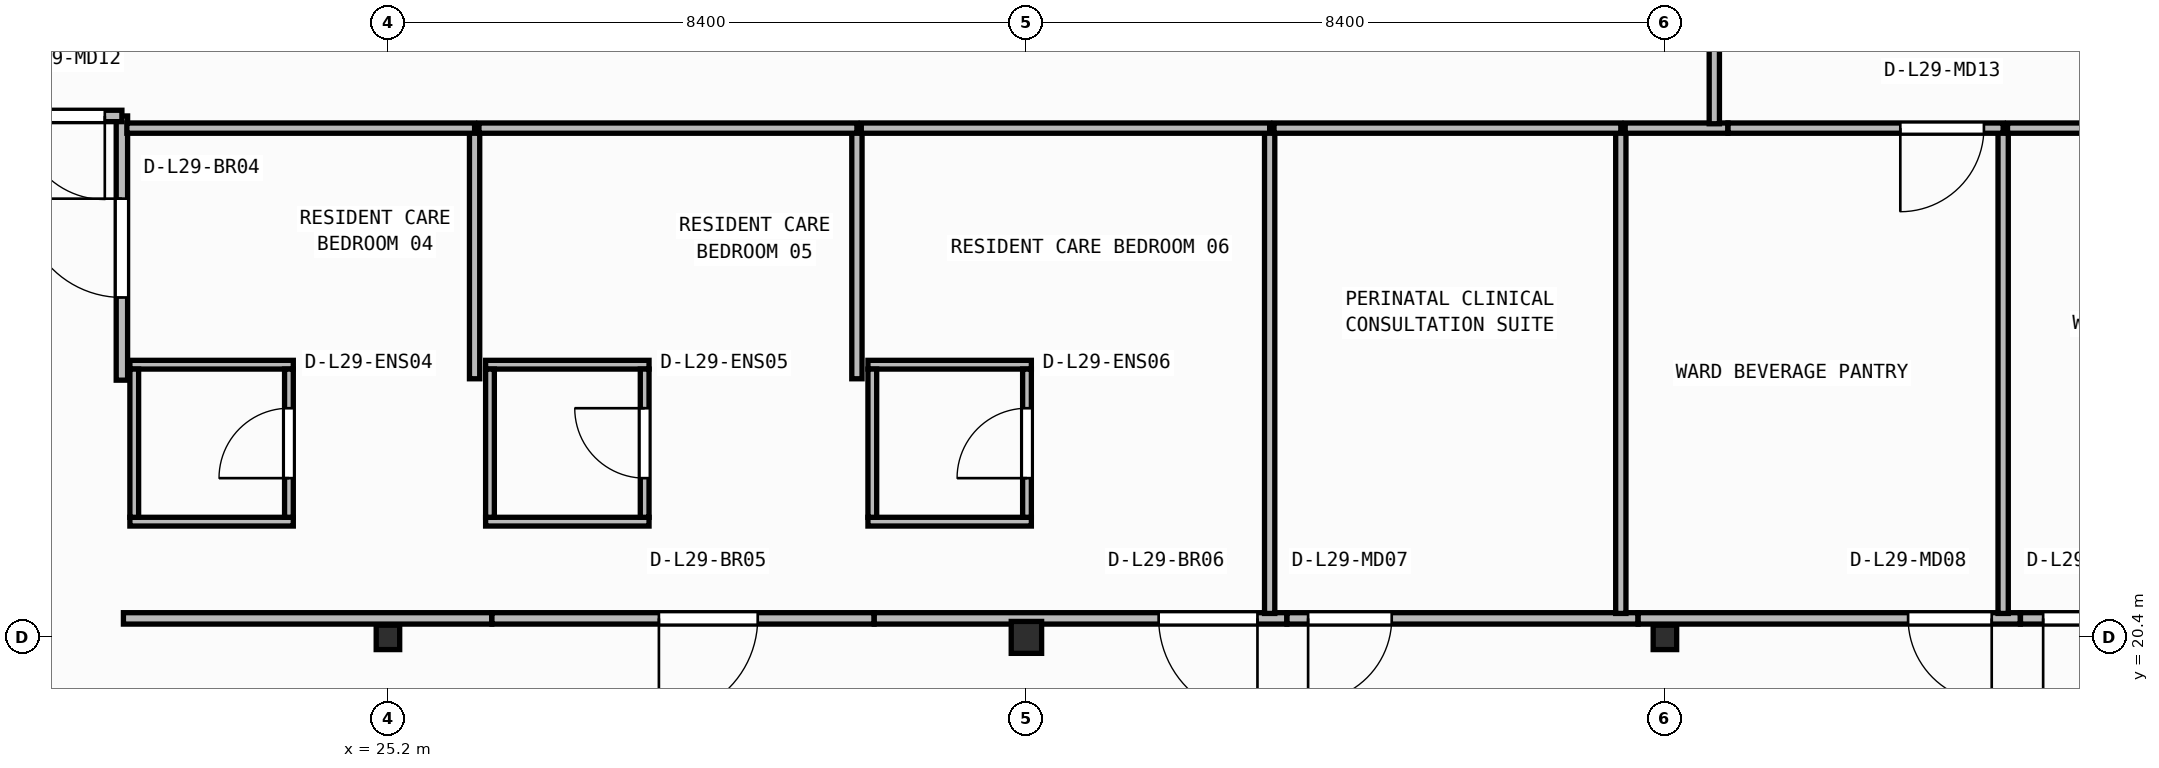
"""IFC4 building model, lengths in metres.
Left out: names, types, materials, properties, quantities, classifications, styles, units other than length and angle.
Written with IfcOpenShell. Run it as: python <this file> out.ifc"""

import sys

from ifc_helpers import new_model, si_unit, direction, frame, frame_2d, origin, origin_2d, place, context, subcontext, project, spatial, rectangle, i_section, extrude, element, fill, save


model = new_model("IFC4")
c1 = context("Model", 3, precision=1e-05, world=origin(), true_north=direction((0.0, 1.0)))
c2 = subcontext(c1, "Body", "Model", "MODEL_VIEW")
j1 = project(units=[si_unit("LENGTHUNIT", "METRE"), si_unit("PLANEANGLEUNIT", "RADIAN")], contexts=[c1])
p1 = place(None, origin())
s1 = spatial("IfcSite", under=j1, at=p1, CompositionType="ELEMENT")
p2 = place(p1, origin())
s2 = spatial("IfcBuilding", under=s1, at=p2, CompositionType="ELEMENT")
p3 = place(p2, frame((0.0, 0.0, 119.15)))
s3 = spatial("IfcBuildingStorey", under=s2, at=p3, CompositionType="ELEMENT", Elevation=119.15)
p4 = place(p3, frame((25.2, 20.4, 0.0), z_axis=(0.0, 0.0, 1.0), x_axis=(1.0, 0.0, 0.0)))
e1 = element("IfcColumn", 1, at=p4, inside=s3, PredefinedType="COLUMN", context=c2, shape_type="SweptSolid", body=[
    extrude(i_section(OverallWidth=0.309, OverallDepth=0.321, WebThickness=0.014, FlangeThickness=0.022, FilletRadius=0.017, at=origin_2d()), origin(), (0.0, 0.0, 1.0), 3.95),
])
p5 = place(p3, frame((33.6, 20.4, 0.0), z_axis=(0.0, 0.0, 1.0), x_axis=(1.0, 0.0, 0.0)))
e2 = element("IfcColumn", 2, at=p5, inside=s3, PredefinedType="COLUMN", context=c2, shape_type="SweptSolid", body=[
    extrude(i_section(OverallWidth=0.4, OverallDepth=0.42, WebThickness=0.025, FlangeThickness=0.04, at=origin_2d()), origin(), (0.0, 0.0, 1.0), 3.95),
])
p6 = place(p3, frame((42.0, 20.4, 0.0), z_axis=(0.0, 0.0, 1.0), x_axis=(1.0, 0.0, 0.0)))
e3 = element("IfcColumn", 3, at=p6, inside=s3, PredefinedType="COLUMN", context=c2, shape_type="SweptSolid", body=[
    extrude(i_section(OverallWidth=0.309, OverallDepth=0.321, WebThickness=0.014, FlangeThickness=0.022, FilletRadius=0.017, at=origin_2d()), origin(), (0.0, 0.0, 1.0), 3.95),
])
for number, where, z_axis, x_axis in (
    (4, (21.805, 21.923, 0.0), (0.0, 0.0, 1.0), (1.0, 0.0, 0.0)),
    (5, (21.805, 23.988, 0.0), (0.0, 0.0, 1.0), (1.0, 0.0, 0.0)),
):
    element("IfcWall", number, at=place(p3, frame(where, z_axis=z_axis, x_axis=x_axis)), inside=s3, PredefinedType="PARTITIONING", context=c2, shape_type="SweptSolid", body=[
        extrude(rectangle(XDim=2.15, YDim=0.115, at=frame_2d((1.075, 0.0))), origin(), (0.0, 0.0, 1.0), 3.71),
    ])
p7 = place(p3, frame((21.863, 21.98, 0.0), z_axis=(0.0, 0.0, 1.0), x_axis=(0.0, 1.0, 0.0)))
e6 = element("IfcWall", 6, at=p7, inside=s3, PredefinedType="PARTITIONING", context=c2, shape_type="SweptSolid", body=[
    extrude(rectangle(XDim=1.95, YDim=0.115, at=frame_2d((0.975, 0.0))), origin(), (0.0, 0.0, 1.0), 3.71),
])
p8 = place(p3, frame((23.897, 21.98, 0.0), z_axis=(0.0, 0.0, 1.0), x_axis=(0.0, 1.0, 0.0)))
e7 = element("IfcWall", 7, at=p8, inside=s3, PredefinedType="PARTITIONING", context=c2, shape_type="SweptSolid", body=[
    extrude(rectangle(XDim=1.95, YDim=0.115, at=frame_2d((0.975, 0.0))), origin(), (0.0, 0.0, 1.0), 3.71),
])
p9 = place(p8, frame((0.515, 0.0, 0.0)))
e8 = element("IfcOpeningElement", 8, at=p9, cuts=e7, PredefinedType="OPENING", context=c2, shape_type="SweptSolid", body=[
    extrude(rectangle(XDim=0.92, YDim=2.1, at=frame_2d((0.46, 1.05))), frame((0.0, 0.067, 0.0), z_axis=(0.0, -1.0, 0.0), x_axis=(1.0, 0.0, 0.0)), (0.0, 0.0, 1.0), 0.135),
])
for number, where, z_axis, x_axis in (
    (9, (26.485, 21.923, 0.0), (0.0, 0.0, 1.0), (1.0, 0.0, 0.0)),
    (10, (26.485, 23.988, 0.0), (0.0, 0.0, 1.0), (1.0, 0.0, 0.0)),
):
    element("IfcWall", number, at=place(p3, frame(where, z_axis=z_axis, x_axis=x_axis)), inside=s3, PredefinedType="PARTITIONING", context=c2, shape_type="SweptSolid", body=[
        extrude(rectangle(XDim=2.15, YDim=0.115, at=frame_2d((1.075, 0.0))), origin(), (0.0, 0.0, 1.0), 3.71),
    ])
p10 = place(p3, frame((26.542, 21.98, 0.0), z_axis=(0.0, 0.0, 1.0), x_axis=(0.0, 1.0, 0.0)))
e11 = element("IfcWall", 11, at=p10, inside=s3, PredefinedType="PARTITIONING", context=c2, shape_type="SweptSolid", body=[
    extrude(rectangle(XDim=1.95, YDim=0.115, at=frame_2d((0.975, 0.0))), origin(), (0.0, 0.0, 1.0), 3.71),
])
p11 = place(p3, frame((28.577, 21.98, 0.0), z_axis=(0.0, 0.0, 1.0), x_axis=(0.0, 1.0, 0.0)))
e12 = element("IfcWall", 12, at=p11, inside=s3, PredefinedType="PARTITIONING", context=c2, shape_type="SweptSolid", body=[
    extrude(rectangle(XDim=1.95, YDim=0.115, at=frame_2d((0.975, 0.0))), origin(), (0.0, 0.0, 1.0), 3.71),
])
p12 = place(p11, frame((0.515, 0.0, 0.0)))
e13 = element("IfcOpeningElement", 13, at=p12, cuts=e12, PredefinedType="OPENING", context=c2, shape_type="SweptSolid", body=[
    extrude(rectangle(XDim=0.92, YDim=2.1, at=frame_2d((0.46, 1.05))), frame((0.0, 0.067, 0.0), z_axis=(0.0, -1.0, 0.0), x_axis=(1.0, 0.0, 0.0)), (0.0, 0.0, 1.0), 0.135),
])
for number, where, z_axis, x_axis in (
    (14, (31.515, 21.923, 0.0), (0.0, 0.0, 1.0), (1.0, 0.0, 0.0)),
    (15, (31.515, 23.988, 0.0), (0.0, 0.0, 1.0), (1.0, 0.0, 0.0)),
):
    element("IfcWall", number, at=place(p3, frame(where, z_axis=z_axis, x_axis=x_axis)), inside=s3, PredefinedType="PARTITIONING", context=c2, shape_type="SweptSolid", body=[
        extrude(rectangle(XDim=2.15, YDim=0.115, at=frame_2d((1.075, 0.0))), origin(), (0.0, 0.0, 1.0), 3.71),
    ])
p13 = place(p3, frame((31.573, 21.98, 0.0), z_axis=(0.0, 0.0, 1.0), x_axis=(0.0, 1.0, 0.0)))
e16 = element("IfcWall", 16, at=p13, inside=s3, PredefinedType="PARTITIONING", context=c2, shape_type="SweptSolid", body=[
    extrude(rectangle(XDim=1.95, YDim=0.115, at=frame_2d((0.975, 0.0))), origin(), (0.0, 0.0, 1.0), 3.71),
])
p14 = place(p3, frame((33.607, 21.98, 0.0), z_axis=(0.0, 0.0, 1.0), x_axis=(0.0, 1.0, 0.0)))
e17 = element("IfcWall", 17, at=p14, inside=s3, PredefinedType="PARTITIONING", context=c2, shape_type="SweptSolid", body=[
    extrude(rectangle(XDim=1.95, YDim=0.115, at=frame_2d((0.975, 0.0))), origin(), (0.0, 0.0, 1.0), 3.152),
])
p15 = place(p14, frame((0.515, 0.0, 0.0)))
e18 = element("IfcOpeningElement", 18, at=p15, cuts=e17, PredefinedType="OPENING", context=c2, shape_type="SweptSolid", body=[
    extrude(rectangle(XDim=0.92, YDim=2.1, at=frame_2d((0.46, 1.05))), frame((0.0, 0.067, 0.0), z_axis=(0.0, -1.0, 0.0), x_axis=(1.0, 0.0, 0.0)), (0.0, 0.0, 1.0), 0.135),
])
p16 = place(p3, frame((21.7, 23.784, 0.0), z_axis=(0.0, 0.0, 1.0), x_axis=(0.0, 1.0, 0.0)))
e19 = element("IfcWall", 19, at=p16, inside=s3, PredefinedType="PARTITIONING", context=c2, shape_type="SweptSolid", body=[
    extrude(rectangle(XDim=3.476, YDim=0.15, at=frame_2d((1.738, 0.0))), origin(), (0.0, 0.0, 1.0), 3.71),
])
p17 = place(p16, frame((1.088, 0.0, 0.0)))
e20 = element("IfcOpeningElement", 20, at=p17, cuts=e19, PredefinedType="OPENING", context=c2, shape_type="SweptSolid", body=[
    extrude(rectangle(XDim=1.3, YDim=2.15, at=frame_2d((0.65, 1.075))), frame((0.0, 0.085, 0.0), z_axis=(0.0, -1.0, 0.0), x_axis=(1.0, 0.0, 0.0)), (0.0, 0.0, 1.0), 0.17),
])
p18 = place(p3, frame((21.7, 27.26, 0.0), z_axis=(0.0, 0.0, 1.0), x_axis=(-1.0, 0.0, 0.0)))
e21 = element("IfcWall", 21, at=p18, inside=s3, PredefinedType="PARTITIONING", context=c2, shape_type="SweptSolid", body=[
    extrude(rectangle(XDim=2.5, YDim=0.15, at=frame_2d((1.25, 0.0))), origin(), (0.0, 0.0, 1.0), 3.71),
])
p19 = place(p18, frame((0.225, 0.0, 0.0)))
e22 = element("IfcOpeningElement", 22, at=p19, cuts=e21, PredefinedType="OPENING", context=c2, shape_type="SweptSolid", body=[
    extrude(rectangle(XDim=1.1, YDim=2.1, at=frame_2d((0.55, 1.05))), frame((0.0, 0.085, 0.0), z_axis=(0.0, -1.0, 0.0), x_axis=(1.0, 0.0, 0.0)), (0.0, 0.0, 1.0), 0.17),
])
p20 = place(p3, frame((26.566, 20.65, 0.0), z_axis=(0.0, 0.0, 1.0), x_axis=(-1.0, 0.0, 0.0)))
e23 = element("IfcWall", 23, at=p20, inside=s3, PredefinedType="PARTITIONING", context=c2, shape_type="SweptSolid", body=[
    extrude(rectangle(XDim=4.846, YDim=0.15, at=frame_2d((2.423, 0.0))), origin(), (0.0, 0.0, 1.0), 3.083),
])
p21 = place(p3, frame((31.596, 20.65, 0.0), z_axis=(0.0, 0.0, 1.0), x_axis=(-1.0, 0.0, 0.0)))
e24 = element("IfcWall", 24, at=p21, inside=s3, PredefinedType="PARTITIONING", context=c2, shape_type="SweptSolid", body=[
    extrude(rectangle(XDim=5.028, YDim=0.15, at=frame_2d((2.514, 0.0))), origin(), (0.0, 0.0, 1.0), 3.083),
])
p22 = place(p21, frame((1.531, 0.0, 0.0)))
e25 = element("IfcOpeningElement", 25, at=p22, cuts=e24, PredefinedType="OPENING", context=c2, shape_type="SweptSolid", body=[
    extrude(rectangle(XDim=1.3, YDim=2.15, at=frame_2d((0.65, 1.075))), frame((0.0, 0.085, 0.0), z_axis=(0.0, -1.0, 0.0), x_axis=(1.0, 0.0, 0.0)), (0.0, 0.0, 1.0), 0.17),
])
p23 = place(p3, frame((37.026, 20.65, 0.0), z_axis=(0.0, 0.0, 1.0), x_axis=(-1.0, 0.0, 0.0)))
e26 = element("IfcWall", 26, at=p23, inside=s3, PredefinedType="PARTITIONING", context=c2, shape_type="SweptSolid", body=[
    extrude(rectangle(XDim=5.428, YDim=0.15, at=frame_2d((2.714, 0.0))), origin(), (0.0, 0.0, 1.0), 3.083),
])
p24 = place(p23, frame((0.386, 0.0, 0.0)))
e27 = element("IfcOpeningElement", 27, at=p24, cuts=e26, PredefinedType="OPENING", context=c2, shape_type="SweptSolid", body=[
    extrude(rectangle(XDim=1.3, YDim=2.15, at=frame_2d((0.65, 1.075))), frame((0.0, 0.085, 0.0), z_axis=(0.0, -1.0, 0.0), x_axis=(1.0, 0.0, 0.0)), (0.0, 0.0, 1.0), 0.17),
])
p25 = place(p3, frame((41.646, 20.65, 0.0), z_axis=(0.0, 0.0, 1.0), x_axis=(-1.0, 0.0, 0.0)))
e28 = element("IfcWall", 28, at=p25, inside=s3, PredefinedType="PARTITIONING", context=c2, shape_type="SweptSolid", body=[
    extrude(rectangle(XDim=4.618, YDim=0.15, at=frame_2d((2.309, 0.0))), origin(), (0.0, 0.0, 1.0), 3.083),
])
p26 = place(p25, frame((3.24, 0.0, 0.0)))
e29 = element("IfcOpeningElement", 29, at=p26, cuts=e28, PredefinedType="OPENING", context=c2, shape_type="SweptSolid", body=[
    extrude(rectangle(XDim=1.1, YDim=2.1, at=frame_2d((0.55, 1.05))), frame((0.0, 0.085, 0.0), z_axis=(0.0, -1.0, 0.0), x_axis=(1.0, 0.0, 0.0)), (0.0, 0.0, 1.0), 0.17),
])
p27 = place(p3, frame((46.676, 20.65, 0.0), z_axis=(0.0, 0.0, 1.0), x_axis=(-1.0, 0.0, 0.0)))
e30 = element("IfcWall", 30, at=p27, inside=s3, PredefinedType="PARTITIONING", context=c2, shape_type="SweptSolid", body=[
    extrude(rectangle(XDim=5.028, YDim=0.15, at=frame_2d((2.514, 0.0))), origin(), (0.0, 0.0, 1.0), 3.083),
])
p28 = place(p27, frame((0.376, 0.0, 0.0)))
e31 = element("IfcOpeningElement", 31, at=p28, cuts=e30, PredefinedType="OPENING", context=c2, shape_type="SweptSolid", body=[
    extrude(rectangle(XDim=1.1, YDim=2.1, at=frame_2d((0.55, 1.05))), frame((0.0, 0.085, 0.0), z_axis=(0.0, -1.0, 0.0), x_axis=(1.0, 0.0, 0.0)), (0.0, 0.0, 1.0), 0.17),
])
p29 = place(p3, frame((52.106, 20.65, 0.0), z_axis=(0.0, 0.0, 1.0), x_axis=(-1.0, 0.0, 0.0)))
e32 = element("IfcWall", 32, at=p29, inside=s3, PredefinedType="PARTITIONING", context=c2, shape_type="SweptSolid", body=[
    extrude(rectangle(XDim=5.428, YDim=0.15, at=frame_2d((2.714, 0.0))), origin(), (0.0, 0.0, 1.0), 3.083),
])
p30 = place(p29, frame((4.03, 0.0, 0.0)))
e33 = element("IfcOpeningElement", 33, at=p30, cuts=e32, PredefinedType="OPENING", context=c2, shape_type="SweptSolid", body=[
    extrude(rectangle(XDim=1.1, YDim=2.1, at=frame_2d((0.55, 1.05))), frame((0.0, 0.085, 0.0), z_axis=(0.0, -1.0, 0.0), x_axis=(1.0, 0.0, 0.0)), (0.0, 0.0, 1.0), 0.17),
])
p31 = place(p3, frame((26.34, 23.802, 0.0), z_axis=(0.0, 0.0, 1.0), x_axis=(0.0, 1.0, 0.0)))
e34 = element("IfcWall", 34, at=p31, inside=s3, PredefinedType="PARTITIONING", context=c2, shape_type="SweptSolid", body=[
    extrude(rectangle(XDim=3.298, YDim=0.135, at=frame_2d((1.649, 0.0))), origin(), (0.0, 0.0, 1.0), 3.71),
])
p32 = place(p3, frame((26.34, 27.1, 0.0), z_axis=(0.0, 0.0, 1.0), x_axis=(-1.0, 0.0, 0.0)))
e35 = element("IfcWall", 35, at=p32, inside=s3, PredefinedType="PARTITIONING", context=c2, shape_type="SweptSolid", body=[
    extrude(rectangle(XDim=4.575, YDim=0.135, at=frame_2d((2.288, 0.0))), origin(), (0.0, 0.0, 1.0), 3.71),
])
p33 = place(p3, frame((31.37, 23.802, 0.0), z_axis=(0.0, 0.0, 1.0), x_axis=(0.0, 1.0, 0.0)))
e36 = element("IfcWall", 36, at=p33, inside=s3, PredefinedType="PARTITIONING", context=c2, shape_type="SweptSolid", body=[
    extrude(rectangle(XDim=3.298, YDim=0.135, at=frame_2d((1.649, 0.0))), origin(), (0.0, 0.0, 1.0), 3.71),
])
p34 = place(p3, frame((31.37, 27.1, 0.0), z_axis=(0.0, 0.0, 1.0), x_axis=(-1.0, 0.0, 0.0)))
e37 = element("IfcWall", 37, at=p34, inside=s3, PredefinedType="PARTITIONING", context=c2, shape_type="SweptSolid", body=[
    extrude(rectangle(XDim=4.973, YDim=0.135, at=frame_2d((2.486, 0.0))), origin(), (0.0, 0.0, 1.0), 3.71),
])
p35 = place(p3, frame((36.8, 20.715, 0.0), z_axis=(0.0, 0.0, 1.0), x_axis=(0.0, 1.0, 0.0)))
e38 = element("IfcWall", 38, at=p35, inside=s3, PredefinedType="PARTITIONING", context=c2, shape_type="SweptSolid", body=[
    extrude(rectangle(XDim=6.385, YDim=0.135, at=frame_2d((3.192, 0.0))), origin(), (0.0, 0.0, 1.0), 3.71),
])
p36 = place(p3, frame((36.8, 27.1, 0.0), z_axis=(0.0, 0.0, 1.0), x_axis=(-1.0, 0.0, 0.0)))
e39 = element("IfcWall", 39, at=p36, inside=s3, PredefinedType="PARTITIONING", context=c2, shape_type="SweptSolid", body=[
    extrude(rectangle(XDim=5.373, YDim=0.135, at=frame_2d((2.686, 0.0))), origin(), (0.0, 0.0, 1.0), 3.71),
])
p37 = place(p3, frame((41.42, 20.715, 0.0), z_axis=(0.0, 0.0, 1.0), x_axis=(0.0, 1.0, 0.0)))
e40 = element("IfcWall", 40, at=p37, inside=s3, PredefinedType="PARTITIONING", context=c2, shape_type="SweptSolid", body=[
    extrude(rectangle(XDim=6.385, YDim=0.135, at=frame_2d((3.192, 0.0))), origin(), (0.0, 0.0, 1.0), 3.71),
])
p38 = place(p3, frame((41.42, 27.1, 0.0), z_axis=(0.0, 0.0, 1.0), x_axis=(-1.0, 0.0, 0.0)))
e41 = element("IfcWall", 41, at=p38, inside=s3, PredefinedType="PARTITIONING", context=c2, shape_type="SweptSolid", body=[
    extrude(rectangle(XDim=4.562, YDim=0.135, at=frame_2d((2.281, 0.0))), origin(), (0.0, 0.0, 1.0), 3.71),
])
p39 = place(p3, frame((46.45, 20.715, 0.0), z_axis=(0.0, 0.0, 1.0), x_axis=(0.0, 1.0, 0.0)))
e42 = element("IfcWall", 42, at=p39, inside=s3, PredefinedType="PARTITIONING", context=c2, shape_type="SweptSolid", body=[
    extrude(rectangle(XDim=6.385, YDim=0.135, at=frame_2d((3.192, 0.0))), origin(), (0.0, 0.0, 1.0), 3.71),
])
p40 = place(p3, frame((42.829, 27.1, 0.0), z_axis=(0.0, 0.0, 1.0), x_axis=(-1.0, 0.0, 0.0)))
e43 = element("IfcWall", 43, at=p40, inside=s3, PredefinedType="PARTITIONING", context=c2, shape_type="SweptSolid", body=[
    extrude(rectangle(XDim=1.351, YDim=0.135, at=frame_2d((0.676, 0.0))), origin(), (0.0, 0.0, 1.0), 3.71),
])
p41 = place(p3, frame((46.45, 27.1, 0.0), z_axis=(0.0, 0.0, 1.0), x_axis=(-1.0, 0.0, 0.0)))
e44 = element("IfcWall", 44, at=p41, inside=s3, PredefinedType="PARTITIONING", context=c2, shape_type="SweptSolid", body=[
    extrude(rectangle(XDim=3.619, YDim=0.135, at=frame_2d((1.81, 0.0))), origin(), (0.0, 0.0, 1.0), 3.71),
])
p42 = place(p41, frame((0.253, 0.0, 0.0)))
e45 = element("IfcOpeningElement", 45, at=p42, cuts=e44, PredefinedType="OPENING", context=c2, shape_type="SweptSolid", body=[
    extrude(rectangle(XDim=1.1, YDim=2.1, at=frame_2d((0.55, 1.05))), frame((0.0, 0.077, 0.0), z_axis=(0.0, -1.0, 0.0), x_axis=(1.0, 0.0, 0.0)), (0.0, 0.0, 1.0), 0.155),
])
p43 = place(p3, frame((51.88, 27.1, 0.0), z_axis=(0.0, 0.0, 1.0), x_axis=(-1.0, 0.0, 0.0)))
e46 = element("IfcWall", 46, at=p43, inside=s3, PredefinedType="PARTITIONING", context=c2, shape_type="SweptSolid", body=[
    extrude(rectangle(XDim=5.372, YDim=0.135, at=frame_2d((2.686, 0.0))), origin(), (0.0, 0.0, 1.0), 3.71),
])
p44 = place(p3, frame((42.65, 27.157, 0.0), z_axis=(0.0, 0.0, 1.0), x_axis=(0.0, 1.0, 0.0)))
e47 = element("IfcWall", 47, at=p44, inside=s3, PredefinedType="PARTITIONING", context=c2, shape_type="SweptSolid", body=[
    extrude(rectangle(XDim=4.381, YDim=0.135, at=frame_2d((2.191, 0.0))), origin(), (0.0, 0.0, 1.0), 3.71),
])
p45 = place(p9, origin())
e48 = element("IfcDoor", 48, at=p45, inside=s3, OperationType="SINGLE_SWING_LEFT", PredefinedType="DOOR", context=c2, shape_type="SweptSolid", body=[
    extrude(rectangle(XDim=0.92, YDim=2.1, at=frame_2d((0.46, 1.05))), frame((0.0, 0.025, 0.0), z_axis=(0.0, -1.0, 0.0), x_axis=(1.0, 0.0, 0.0)), (0.0, 0.0, 1.0), 0.05),
])
fill(e8, e48)
p46 = place(p12, origin())
e49 = element("IfcDoor", 49, at=p46, inside=s3, OperationType="SINGLE_SWING_RIGHT", PredefinedType="DOOR", context=c2, shape_type="SweptSolid", body=[
    extrude(rectangle(XDim=0.92, YDim=2.1, at=frame_2d((0.46, 1.05))), frame((0.0, 0.025, 0.0), z_axis=(0.0, -1.0, 0.0), x_axis=(1.0, 0.0, 0.0)), (0.0, 0.0, 1.0), 0.05),
])
fill(e13, e49)
p47 = place(p15, origin())
e50 = element("IfcDoor", 50, at=p47, inside=s3, OperationType="SINGLE_SWING_LEFT", PredefinedType="DOOR", context=c2, shape_type="SweptSolid", body=[
    extrude(rectangle(XDim=0.92, YDim=2.1, at=frame_2d((0.46, 1.05))), frame((0.0, 0.025, 0.0), z_axis=(0.0, -1.0, 0.0), x_axis=(1.0, 0.0, 0.0)), (0.0, 0.0, 1.0), 0.05),
])
fill(e18, e50)
p48 = place(p17, origin())
e51 = element("IfcDoor", 51, at=p48, inside=s3, OperationType="SINGLE_SWING_RIGHT", PredefinedType="DOOR", context=c2, shape_type="SweptSolid", body=[
    extrude(rectangle(XDim=1.3, YDim=2.15, at=frame_2d((0.65, 1.075))), frame((0.0, 0.025, 0.0), z_axis=(0.0, -1.0, 0.0), x_axis=(1.0, 0.0, 0.0)), (0.0, 0.0, 1.0), 0.05),
])
fill(e20, e51)
p49 = place(p19, origin())
e52 = element("IfcDoor", 52, at=p49, inside=s3, OperationType="SINGLE_SWING_LEFT", PredefinedType="DOOR", context=c2, shape_type="SweptSolid", body=[
    extrude(rectangle(XDim=1.1, YDim=2.1, at=frame_2d((0.55, 1.05))), frame((0.0, 0.025, 0.0), z_axis=(0.0, -1.0, 0.0), x_axis=(1.0, 0.0, 0.0)), (0.0, 0.0, 1.0), 0.05),
])
fill(e22, e52)
p50 = place(p22, origin())
e53 = element("IfcDoor", 53, at=p50, inside=s3, OperationType="SINGLE_SWING_RIGHT", PredefinedType="DOOR", context=c2, shape_type="SweptSolid", body=[
    extrude(rectangle(XDim=1.3, YDim=2.15, at=frame_2d((0.65, 1.075))), frame((0.0, 0.025, 0.0), z_axis=(0.0, -1.0, 0.0), x_axis=(1.0, 0.0, 0.0)), (0.0, 0.0, 1.0), 0.05),
])
fill(e25, e53)
p51 = place(p24, origin())
e54 = element("IfcDoor", 54, at=p51, inside=s3, OperationType="SINGLE_SWING_LEFT", PredefinedType="DOOR", context=c2, shape_type="SweptSolid", body=[
    extrude(rectangle(XDim=1.3, YDim=2.15, at=frame_2d((0.65, 1.075))), frame((0.0, 0.025, 0.0), z_axis=(0.0, -1.0, 0.0), x_axis=(1.0, 0.0, 0.0)), (0.0, 0.0, 1.0), 0.05),
])
fill(e27, e54)
p52 = place(p26, origin())
e55 = element("IfcDoor", 55, at=p52, inside=s3, OperationType="SINGLE_SWING_RIGHT", PredefinedType="DOOR", context=c2, shape_type="SweptSolid", body=[
    extrude(rectangle(XDim=1.1, YDim=2.1, at=frame_2d((0.55, 1.05))), frame((0.0, 0.025, 0.0), z_axis=(0.0, -1.0, 0.0), x_axis=(1.0, 0.0, 0.0)), (0.0, 0.0, 1.0), 0.05),
])
fill(e29, e55)
p53 = place(p28, origin())
e56 = element("IfcDoor", 56, at=p53, inside=s3, OperationType="SINGLE_SWING_LEFT", PredefinedType="DOOR", context=c2, shape_type="SweptSolid", body=[
    extrude(rectangle(XDim=1.1, YDim=2.1, at=frame_2d((0.55, 1.05))), frame((0.0, 0.025, 0.0), z_axis=(0.0, -1.0, 0.0), x_axis=(1.0, 0.0, 0.0)), (0.0, 0.0, 1.0), 0.05),
])
fill(e31, e56)
p54 = place(p30, origin())
e57 = element("IfcDoor", 57, at=p54, inside=s3, OperationType="SINGLE_SWING_RIGHT", PredefinedType="DOOR", context=c2, shape_type="SweptSolid", body=[
    extrude(rectangle(XDim=1.1, YDim=2.1, at=frame_2d((0.55, 1.05))), frame((0.0, 0.025, 0.0), z_axis=(0.0, -1.0, 0.0), x_axis=(1.0, 0.0, 0.0)), (0.0, 0.0, 1.0), 0.05),
])
fill(e33, e57)
p55 = place(p42, origin())
e58 = element("IfcDoor", 58, at=p55, inside=s3, OperationType="SINGLE_SWING_RIGHT", PredefinedType="DOOR", context=c2, shape_type="SweptSolid", body=[
    extrude(rectangle(XDim=1.1, YDim=2.1, at=frame_2d((0.55, 1.05))), frame((0.0, 0.025, 0.0), z_axis=(0.0, -1.0, 0.0), x_axis=(1.0, 0.0, 0.0)), (0.0, 0.0, 1.0), 0.05),
])
fill(e45, e58)
save(model, sys.argv[1])
